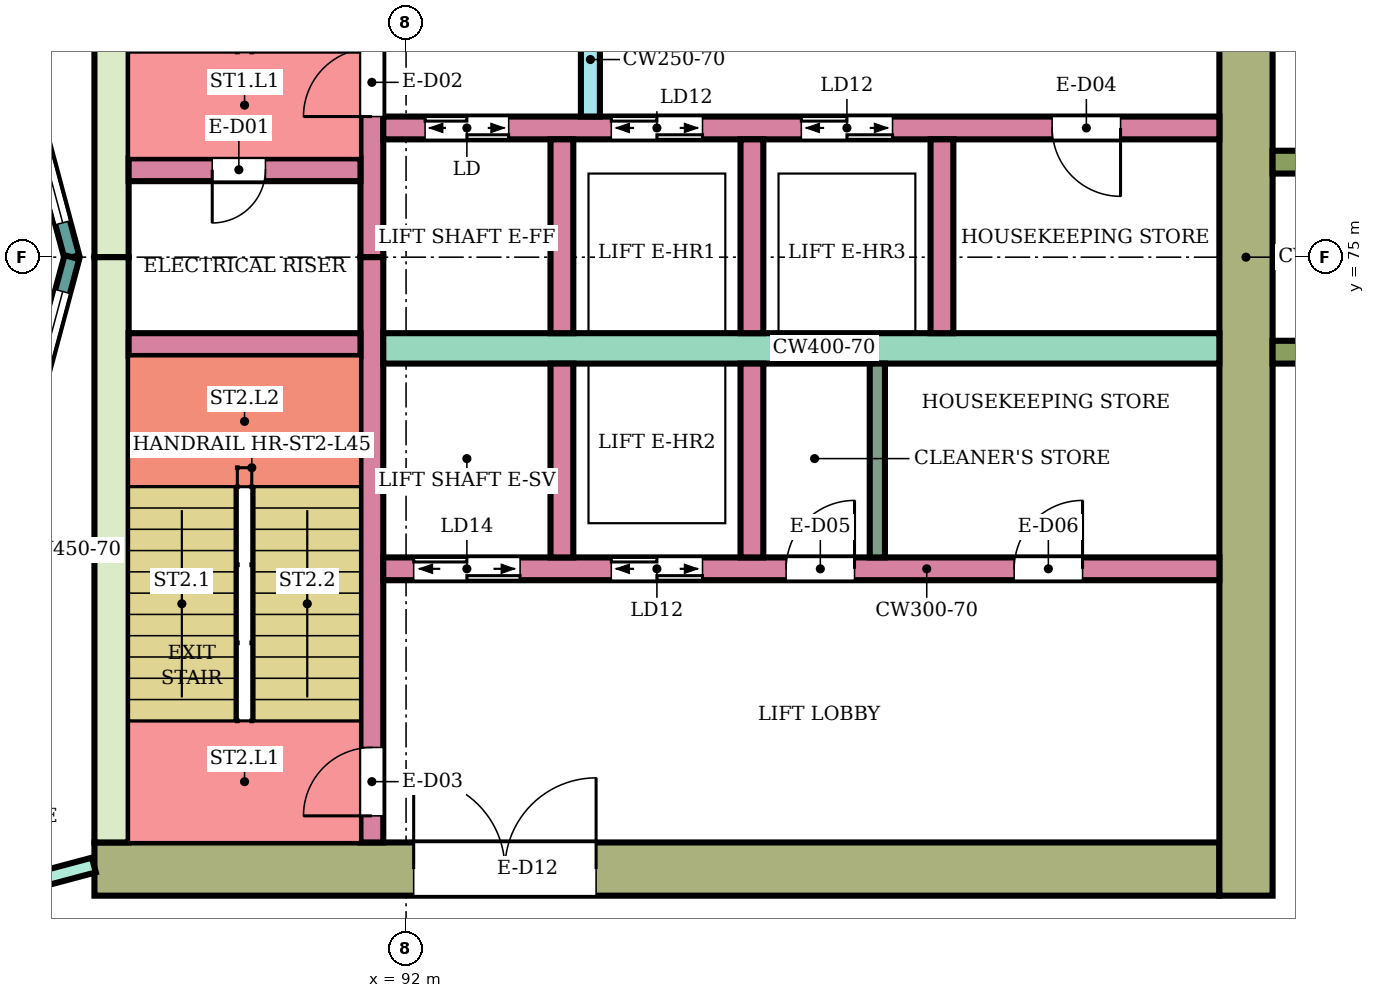
"""IFC4 building model, lengths in metres.
Left out: names, types, materials, properties, quantities, classifications, styles, units other than length and angle.
Written with IfcOpenShell. Run it as: python <this file> out.ifc"""

import sys

from ifc_helpers import new_model, si_unit, direction, frame, frame_2d, origin, place, context, subcontext, project, spatial, rectangle, extrude, element, fill, save


model = new_model("IFC4")
c1 = context("Model", 3, precision=1e-05, world=origin(), true_north=direction((0.0, 1.0)))
c2 = subcontext(c1, "Body", "Model", "MODEL_VIEW")
j1 = project(units=[si_unit("LENGTHUNIT", "METRE"), si_unit("PLANEANGLEUNIT", "RADIAN")], contexts=[c1])
p1 = place(None, origin())
s1 = spatial("IfcSite", under=j1, at=p1, CompositionType="ELEMENT")
p2 = place(p1, origin())
s2 = spatial("IfcBuilding", under=s1, at=p2, CompositionType="ELEMENT")
p3 = place(p2, frame((0.0, 0.0, 194.6)))
s3 = spatial("IfcBuildingStorey", under=s2, at=p3, CompositionType="ELEMENT", Elevation=194.6)
p4 = place(p3, frame((87.9, 66.95, 0.0), z_axis=(0.0, 0.0, 1.0), x_axis=(1.0, 0.0, 0.0)))
e1 = element("IfcWall", 1, at=p4, inside=s3, PredefinedType="SHEAR", context=c2, shape_type="SweptSolid", body=[
    extrude(rectangle(XDim=14.8, YDim=0.7, at=frame_2d((7.4, 0.0))), origin(), (0.0, 0.0, 1.0), 3.78),
])
p5 = place(p4, frame((4.2, 0.0, 0.0)))
e2 = element("IfcOpeningElement", 2, at=p5, cuts=e1, PredefinedType="OPENING", context=c2, shape_type="SweptSolid", body=[
    extrude(rectangle(XDim=2.4, YDim=2.4, at=frame_2d((1.2, 1.2))), frame((0.0, 0.36, 0.0), z_axis=(0.0, -1.0, 0.0), x_axis=(1.0, 0.0, 0.0)), (0.0, 0.0, 1.0), 0.72),
])
for number, where, z_axis, x_axis in (
    (3, (88.125, 75.0, 0.0), (0.0, 0.0, 1.0), (0.0, 1.0, 0.0)),
    (4, (88.125, 67.3, 0.0), (0.0, 0.0, 1.0), (0.0, 1.0, 0.0)),
):
    element("IfcWall", number, at=place(p3, frame(where, z_axis=z_axis, x_axis=x_axis)), inside=s3, PredefinedType="SHEAR", context=c2, shape_type="SweptSolid", body=[
        extrude(rectangle(XDim=7.7, YDim=0.45, at=frame_2d((3.85, 0.0))), origin(), (0.0, 0.0, 1.0), 3.78),
    ])
p6 = place(p3, frame((103.05, 66.6, 0.0), z_axis=(0.0, 0.0, 1.0), x_axis=(0.0, 1.0, 0.0)))
e5 = element("IfcWall", 5, at=p6, inside=s3, PredefinedType="SHEAR", context=c2, shape_type="SweptSolid", body=[
    extrude(rectangle(XDim=16.8, YDim=0.7, at=frame_2d((8.4, 0.0))), origin(), (0.0, 0.0, 1.0), 3.78),
])
p7 = place(p3, frame((91.55, 75.0, 0.0), z_axis=(0.0, 0.0, 1.0), x_axis=(0.0, 1.0, 0.0)))
e6 = element("IfcWall", 6, at=p7, inside=s3, PredefinedType="SHEAR", context=c2, shape_type="SweptSolid", body=[
    extrude(rectangle(XDim=7.7, YDim=0.3, at=frame_2d((3.85, 0.0))), origin(), (0.0, 0.0, 1.0), 3.78),
])
p8 = place(p7, frame((1.85, 0.0, 0.0)))
e7 = element("IfcOpeningElement", 7, at=p8, cuts=e6, PredefinedType="OPENING", context=c2, shape_type="SweptSolid", body=[
    extrude(rectangle(XDim=0.9, YDim=2.1, at=frame_2d((0.45, 1.05))), frame((0.0, 0.16, 0.0), z_axis=(0.0, -1.0, 0.0), x_axis=(1.0, 0.0, 0.0)), (0.0, 0.0, 1.0), 0.32),
])
p9 = place(p3, frame((91.55, 67.3, 0.0), z_axis=(0.0, 0.0, 1.0), x_axis=(0.0, 1.0, 0.0)))
e8 = element("IfcWall", 8, at=p9, inside=s3, PredefinedType="SHEAR", context=c2, shape_type="SweptSolid", body=[
    extrude(rectangle(XDim=7.7, YDim=0.3, at=frame_2d((3.85, 0.0))), origin(), (0.0, 0.0, 1.0), 3.78),
])
p10 = place(p9, frame((0.35, 0.0, 0.0)))
e9 = element("IfcOpeningElement", 9, at=p10, cuts=e8, PredefinedType="OPENING", context=c2, shape_type="SweptSolid", body=[
    extrude(rectangle(XDim=0.9, YDim=2.1, at=frame_2d((0.45, 1.05))), frame((0.0, 0.16, 0.0), z_axis=(0.0, -1.0, 0.0), x_axis=(1.0, 0.0, 0.0)), (0.0, 0.0, 1.0), 0.32),
])
p11 = place(p3, frame((88.35, 76.15, 0.0), z_axis=(0.0, 0.0, 1.0), x_axis=(1.0, 0.0, 0.0)))
e10 = element("IfcWall", 10, at=p11, inside=s3, PredefinedType="SHEAR", context=c2, shape_type="SweptSolid", body=[
    extrude(rectangle(XDim=3.05, YDim=0.3, at=frame_2d((1.525, 0.0))), origin(), (0.0, 0.0, 1.0), 3.78),
])
p12 = place(p11, frame((1.1, 0.0, 0.0)))
e11 = element("IfcOpeningElement", 11, at=p12, cuts=e10, PredefinedType="OPENING", context=c2, shape_type="SweptSolid", body=[
    extrude(rectangle(XDim=0.7, YDim=2.0, at=frame_2d((0.35, 1.0))), frame((0.0, 0.16, 0.0), z_axis=(0.0, -1.0, 0.0), x_axis=(1.0, 0.0, 0.0)), (0.0, 0.0, 1.0), 0.32),
])
p13 = place(p3, frame((88.35, 73.85, 0.0), z_axis=(0.0, 0.0, 1.0), x_axis=(1.0, 0.0, 0.0)))
e12 = element("IfcWall", 12, at=p13, inside=s3, PredefinedType="SHEAR", context=c2, shape_type="SweptSolid", body=[
    extrude(rectangle(XDim=3.05, YDim=0.3, at=frame_2d((1.525, 0.0))), origin(), (0.0, 0.0, 1.0), 3.78),
])
p14 = place(p3, frame((91.7, 76.7, 0.0), z_axis=(0.0, 0.0, 1.0), x_axis=(1.0, 0.0, 0.0)))
e13 = element("IfcWall", 13, at=p14, inside=s3, PredefinedType="SHEAR", context=c2, shape_type="SweptSolid", body=[
    extrude(rectangle(XDim=11.0, YDim=0.3, at=frame_2d((5.5, 0.0))), origin(), (0.0, 0.0, 1.0), 3.78),
])
p15 = place(p14, frame((0.55, 0.0, 0.0)))
e14 = element("IfcOpeningElement", 14, at=p15, cuts=e13, PredefinedType="OPENING", context=c2, shape_type="SweptSolid", body=[
    extrude(rectangle(XDim=1.1, YDim=2.1, at=frame_2d((0.55, 1.05))), frame((0.0, 0.16, 0.0), z_axis=(0.0, -1.0, 0.0), x_axis=(1.0, 0.0, 0.0)), (0.0, 0.0, 1.0), 0.32),
])
p16 = place(p14, frame((3.0, 0.0, 0.0)))
e15 = element("IfcOpeningElement", 15, at=p16, cuts=e13, PredefinedType="OPENING", context=c2, shape_type="SweptSolid", body=[
    extrude(rectangle(XDim=1.2, YDim=2.1, at=frame_2d((0.6, 1.05))), frame((0.0, 0.16, 0.0), z_axis=(0.0, -1.0, 0.0), x_axis=(1.0, 0.0, 0.0)), (0.0, 0.0, 1.0), 0.32),
])
p17 = place(p14, frame((5.5, 0.0, 0.0)))
e16 = element("IfcOpeningElement", 16, at=p17, cuts=e13, PredefinedType="OPENING", context=c2, shape_type="SweptSolid", body=[
    extrude(rectangle(XDim=1.2, YDim=2.1, at=frame_2d((0.6, 1.05))), frame((0.0, 0.16, 0.0), z_axis=(0.0, -1.0, 0.0), x_axis=(1.0, 0.0, 0.0)), (0.0, 0.0, 1.0), 0.32),
])
p18 = place(p14, frame((8.8, 0.0, 0.0)))
e17 = element("IfcOpeningElement", 17, at=p18, cuts=e13, PredefinedType="OPENING", context=c2, shape_type="SweptSolid", body=[
    extrude(rectangle(XDim=0.9, YDim=2.1, at=frame_2d((0.45, 1.05))), frame((0.0, 0.16, 0.0), z_axis=(0.0, -1.0, 0.0), x_axis=(1.0, 0.0, 0.0)), (0.0, 0.0, 1.0), 0.32),
])
p19 = place(p3, frame((91.7, 73.8, 0.0), z_axis=(0.0, 0.0, 1.0), x_axis=(1.0, 0.0, 0.0)))
e18 = element("IfcWall", 18, at=p19, inside=s3, PredefinedType="SHEAR", context=c2, shape_type="SweptSolid", body=[
    extrude(rectangle(XDim=11.0, YDim=0.4, at=frame_2d((5.5, 0.0))), origin(), (0.0, 0.0, 1.0), 3.78),
])
p20 = place(p3, frame((91.7, 70.9, 0.0), z_axis=(0.0, 0.0, 1.0), x_axis=(1.0, 0.0, 0.0)))
e19 = element("IfcWall", 19, at=p20, inside=s3, PredefinedType="SHEAR", context=c2, shape_type="SweptSolid", body=[
    extrude(rectangle(XDim=11.0, YDim=0.3, at=frame_2d((5.5, 0.0))), origin(), (0.0, 0.0, 1.0), 3.78),
])
p21 = place(p20, frame((0.4, 0.0, 0.0)))
e20 = element("IfcOpeningElement", 20, at=p21, cuts=e19, PredefinedType="OPENING", context=c2, shape_type="SweptSolid", body=[
    extrude(rectangle(XDim=1.4, YDim=2.1, at=frame_2d((0.7, 1.05))), frame((0.0, 0.16, 0.0), z_axis=(0.0, -1.0, 0.0), x_axis=(1.0, 0.0, 0.0)), (0.0, 0.0, 1.0), 0.32),
])
p22 = place(p20, frame((3.0, 0.0, 0.0)))
e21 = element("IfcOpeningElement", 21, at=p22, cuts=e19, PredefinedType="OPENING", context=c2, shape_type="SweptSolid", body=[
    extrude(rectangle(XDim=1.2, YDim=2.1, at=frame_2d((0.6, 1.05))), frame((0.0, 0.16, 0.0), z_axis=(0.0, -1.0, 0.0), x_axis=(1.0, 0.0, 0.0)), (0.0, 0.0, 1.0), 0.32),
])
p23 = place(p20, frame((5.3, 0.0, 0.0)))
e22 = element("IfcOpeningElement", 22, at=p23, cuts=e19, PredefinedType="OPENING", context=c2, shape_type="SweptSolid", body=[
    extrude(rectangle(XDim=0.9, YDim=2.1, at=frame_2d((0.45, 1.05))), frame((0.0, 0.16, 0.0), z_axis=(0.0, -1.0, 0.0), x_axis=(1.0, 0.0, 0.0)), (0.0, 0.0, 1.0), 0.32),
])
p24 = place(p20, frame((8.3, 0.0, 0.0)))
e23 = element("IfcOpeningElement", 23, at=p24, cuts=e19, PredefinedType="OPENING", context=c2, shape_type="SweptSolid", body=[
    extrude(rectangle(XDim=0.9, YDim=2.1, at=frame_2d((0.45, 1.05))), frame((0.0, 0.16, 0.0), z_axis=(0.0, -1.0, 0.0), x_axis=(1.0, 0.0, 0.0)), (0.0, 0.0, 1.0), 0.32),
])
for number, where, z_axis, x_axis in (
    (24, (94.05, 74.0, 0.0), (0.0, 0.0, 1.0), (0.0, 1.0, 0.0)),
    (25, (96.55, 74.0, 0.0), (0.0, 0.0, 1.0), (0.0, 1.0, 0.0)),
    (26, (99.05, 74.0, 0.0), (0.0, 0.0, 1.0), (0.0, 1.0, 0.0)),
    (27, (94.05, 71.05, 0.0), (0.0, 0.0, 1.0), (0.0, 1.0, 0.0)),
    (28, (96.55, 71.05, 0.0), (0.0, 0.0, 1.0), (0.0, 1.0, 0.0)),
):
    element("IfcWall", number, at=place(p3, frame(where, z_axis=z_axis, x_axis=x_axis)), inside=s3, PredefinedType="SHEAR", context=c2, shape_type="SweptSolid", body=[
        extrude(rectangle(XDim=2.55, YDim=0.3, at=frame_2d((1.275, 0.0))), origin(), (0.0, 0.0, 1.0), 3.78),
    ])
p25 = place(p3, frame((94.425, 76.85, 0.0), z_axis=(0.0, 0.0, 1.0), x_axis=(0.0, 1.0, 0.0)))
e29 = element("IfcWall", 29, at=p25, inside=s3, PredefinedType="SHEAR", context=c2, shape_type="SweptSolid", body=[
    extrude(rectangle(XDim=1.5, YDim=0.25, at=frame_2d((0.75, 0.0))), origin(), (0.0, 0.0, 1.0), 3.78),
])
for number, where, z_axis, x_axis in (
    (30, (103.4, 73.75, 0.0), (0.0, 0.0, 1.0), (1.0, 0.0, 0.0)),
    (31, (103.4, 76.25, 0.0), (0.0, 0.0, 1.0), (1.0, 0.0, 0.0)),
):
    element("IfcWall", number, at=place(p3, frame(where, z_axis=z_axis, x_axis=x_axis)), inside=s3, PredefinedType="NOTDEFINED", context=c2, shape_type="SweptSolid", body=[
        extrude(rectangle(XDim=2.416, YDim=0.3, at=frame_2d((1.208, 0.0))), origin(), (0.0, 0.0, 1.0), 4.1),
    ])
p26 = place(p3, frame((87.604, 75.0, 0.0), z_axis=(0.0, 0.0, 1.0), x_axis=(-0.258789828301, 0.965933654434, 0.0)))
e32 = element("IfcWall", 32, at=p26, inside=s3, PredefinedType="NOTDEFINED", context=c2, shape_type="SweptSolid", body=[
    extrude(rectangle(XDim=3.936, YDim=0.2, at=frame_2d((1.968, 0.0))), origin(), (0.0, 0.0, 1.0), 4.1),
])
p27 = place(p26, frame((0.468, 0.0, 0.9)))
e33 = element("IfcOpeningElement", 33, at=p27, cuts=e32, PredefinedType="OPENING", context=c2, shape_type="SweptSolid", body=[
    extrude(rectangle(XDim=3.0, YDim=2.3, at=frame_2d((1.5, 1.15))), frame((0.0, 0.11, 0.0), z_axis=(0.0, -1.0, 0.0), x_axis=(1.0, 0.0, 0.0)), (0.0, 0.0, 1.0), 0.22),
])
p28 = place(p3, frame((86.585, 71.198, 0.0), z_axis=(0.0, 0.0, 1.0), x_axis=(0.258789828301, 0.965933654434, 0.0)))
e34 = element("IfcWall", 34, at=p28, inside=s3, PredefinedType="NOTDEFINED", context=c2, shape_type="SweptSolid", body=[
    extrude(rectangle(XDim=3.936, YDim=0.2, at=frame_2d((1.968, 0.0))), origin(), (0.0, 0.0, 1.0), 4.1),
])
p29 = place(p28, frame((0.468, 0.0, 0.9)))
e35 = element("IfcOpeningElement", 35, at=p29, cuts=e34, PredefinedType="OPENING", context=c2, shape_type="SweptSolid", body=[
    extrude(rectangle(XDim=3.0, YDim=2.3, at=frame_2d((1.5, 1.15))), frame((0.0, 0.11, 0.0), z_axis=(0.0, -1.0, 0.0), x_axis=(1.0, 0.0, 0.0)), (0.0, 0.0, 1.0), 0.22),
])
p30 = place(p3, frame((80.0, 64.898, 0.0), z_axis=(0.0, 0.0, 1.0), x_axis=(0.966236923997, 0.25765520896, 0.0)))
e36 = element("IfcWall", 36, at=p30, inside=s3, PredefinedType="PARTITIONING", context=c2, shape_type="SweptSolid", body=[
    extrude(rectangle(XDim=8.168, YDim=0.2, at=frame_2d((4.084, 0.0))), origin(), (0.0, 0.0, 1.0), 3.65),
])
p31 = place(p30, frame((1.893, 0.0, 0.0)))
e37 = element("IfcOpeningElement", 37, at=p31, cuts=e36, PredefinedType="OPENING", context=c2, shape_type="SweptSolid", body=[
    extrude(rectangle(XDim=1.8, YDim=2.1, at=frame_2d((0.9, 1.05))), frame((0.0, 0.11, 0.0), z_axis=(0.0, -1.0, 0.0), x_axis=(1.0, 0.0, 0.0)), (0.0, 0.0, 1.0), 0.22),
])
p32 = place(p3, frame((98.2, 71.05, 0.0), z_axis=(0.0, 0.0, 1.0), x_axis=(0.0, 1.0, 0.0)))
e38 = element("IfcWall", 38, at=p32, inside=s3, PredefinedType="PARTITIONING", context=c2, shape_type="SweptSolid", body=[
    extrude(rectangle(XDim=2.55, YDim=0.2, at=frame_2d((1.275, 0.0))), origin(), (0.0, 0.0, 1.0), 3.78),
])
p33 = place(p27, origin())
e39 = element("IfcWindow", 39, at=p33, inside=s3, PartitioningType="SINGLE_PANEL", PredefinedType="WINDOW", context=c2, shape_type="SweptSolid", body=[
    extrude(rectangle(XDim=3.0, YDim=2.3, at=frame_2d((1.5, 1.15))), frame((0.0, 0.03, 0.0), z_axis=(0.0, -1.0, 0.0), x_axis=(1.0, 0.0, 0.0)), (0.0, 0.0, 1.0), 0.06),
])
fill(e33, e39)
p34 = place(p29, origin())
e40 = element("IfcWindow", 40, at=p34, inside=s3, PartitioningType="SINGLE_PANEL", PredefinedType="WINDOW", context=c2, shape_type="SweptSolid", body=[
    extrude(rectangle(XDim=3.0, YDim=2.3, at=frame_2d((1.5, 1.15))), frame((0.0, 0.03, 0.0), z_axis=(0.0, -1.0, 0.0), x_axis=(1.0, 0.0, 0.0)), (0.0, 0.0, 1.0), 0.06),
])
fill(e35, e40)
p35 = place(p12, frame((0.7, 0.0, 0.0), z_axis=(0.0, 0.0, 1.0), x_axis=(-1.0, 0.0, 0.0)))
e41 = element("IfcDoor", 41, at=p35, inside=s3, OperationType="SINGLE_SWING_RIGHT", PredefinedType="DOOR", context=c2, shape_type="SweptSolid", body=[
    extrude(rectangle(XDim=0.7, YDim=2.0, at=frame_2d((0.35, 1.0))), frame((0.0, 0.025, 0.0), z_axis=(0.0, -1.0, 0.0), x_axis=(1.0, 0.0, 0.0)), (0.0, 0.0, 1.0), 0.05),
])
fill(e11, e41)
p36 = place(p8, origin())
e42 = element("IfcDoor", 42, at=p36, inside=s3, OperationType="SINGLE_SWING_LEFT", PredefinedType="DOOR", context=c2, shape_type="SweptSolid", body=[
    extrude(rectangle(XDim=0.9, YDim=2.1, at=frame_2d((0.45, 1.05))), frame((0.0, 0.025, 0.0), z_axis=(0.0, -1.0, 0.0), x_axis=(1.0, 0.0, 0.0)), (0.0, 0.0, 1.0), 0.05),
])
fill(e7, e42)
p37 = place(p10, origin())
e43 = element("IfcDoor", 43, at=p37, inside=s3, OperationType="SINGLE_SWING_LEFT", PredefinedType="DOOR", context=c2, shape_type="SweptSolid", body=[
    extrude(rectangle(XDim=0.9, YDim=2.1, at=frame_2d((0.45, 1.05))), frame((0.0, 0.025, 0.0), z_axis=(0.0, -1.0, 0.0), x_axis=(1.0, 0.0, 0.0)), (0.0, 0.0, 1.0), 0.05),
])
fill(e9, e43)
p38 = place(p15, origin())
e44 = element("IfcDoor", 44, at=p38, inside=s3, OperationType="DOUBLE_DOOR_SLIDING", PredefinedType="DOOR", context=c2, shape_type="SweptSolid", body=[
    extrude(rectangle(XDim=1.1, YDim=2.1, at=frame_2d((0.55, 1.05))), frame((0.0, 0.025, 0.0), z_axis=(0.0, -1.0, 0.0), x_axis=(1.0, 0.0, 0.0)), (0.0, 0.0, 1.0), 0.05),
])
fill(e14, e44)
p39 = place(p16, origin())
e45 = element("IfcDoor", 45, at=p39, inside=s3, OperationType="DOUBLE_DOOR_SLIDING", PredefinedType="DOOR", context=c2, shape_type="SweptSolid", body=[
    extrude(rectangle(XDim=1.2, YDim=2.1, at=frame_2d((0.6, 1.05))), frame((0.0, 0.025, 0.0), z_axis=(0.0, -1.0, 0.0), x_axis=(1.0, 0.0, 0.0)), (0.0, 0.0, 1.0), 0.05),
])
fill(e15, e45)
p40 = place(p17, origin())
e46 = element("IfcDoor", 46, at=p40, inside=s3, OperationType="DOUBLE_DOOR_SLIDING", PredefinedType="DOOR", context=c2, shape_type="SweptSolid", body=[
    extrude(rectangle(XDim=1.2, YDim=2.1, at=frame_2d((0.6, 1.05))), frame((0.0, 0.025, 0.0), z_axis=(0.0, -1.0, 0.0), x_axis=(1.0, 0.0, 0.0)), (0.0, 0.0, 1.0), 0.05),
])
fill(e16, e46)
p41 = place(p18, frame((0.9, 0.0, 0.0), z_axis=(0.0, 0.0, 1.0), x_axis=(-1.0, 0.0, 0.0)))
e47 = element("IfcDoor", 47, at=p41, inside=s3, OperationType="SINGLE_SWING_LEFT", PredefinedType="DOOR", context=c2, shape_type="SweptSolid", body=[
    extrude(rectangle(XDim=0.9, YDim=2.1, at=frame_2d((0.45, 1.05))), frame((0.0, 0.025, 0.0), z_axis=(0.0, -1.0, 0.0), x_axis=(1.0, 0.0, 0.0)), (0.0, 0.0, 1.0), 0.05),
])
fill(e17, e47)
p42 = place(p21, origin())
e48 = element("IfcDoor", 48, at=p42, inside=s3, OperationType="DOUBLE_DOOR_SLIDING", PredefinedType="DOOR", context=c2, shape_type="SweptSolid", body=[
    extrude(rectangle(XDim=1.4, YDim=2.1, at=frame_2d((0.7, 1.05))), frame((0.0, 0.025, 0.0), z_axis=(0.0, -1.0, 0.0), x_axis=(1.0, 0.0, 0.0)), (0.0, 0.0, 1.0), 0.05),
])
fill(e20, e48)
p43 = place(p22, origin())
e49 = element("IfcDoor", 49, at=p43, inside=s3, OperationType="DOUBLE_DOOR_SLIDING", PredefinedType="DOOR", context=c2, shape_type="SweptSolid", body=[
    extrude(rectangle(XDim=1.2, YDim=2.1, at=frame_2d((0.6, 1.05))), frame((0.0, 0.025, 0.0), z_axis=(0.0, -1.0, 0.0), x_axis=(1.0, 0.0, 0.0)), (0.0, 0.0, 1.0), 0.05),
])
fill(e21, e49)
p44 = place(p23, origin())
e50 = element("IfcDoor", 50, at=p44, inside=s3, OperationType="SINGLE_SWING_RIGHT", PredefinedType="DOOR", context=c2, shape_type="SweptSolid", body=[
    extrude(rectangle(XDim=0.9, YDim=2.1, at=frame_2d((0.45, 1.05))), frame((0.0, 0.025, 0.0), z_axis=(0.0, -1.0, 0.0), x_axis=(1.0, 0.0, 0.0)), (0.0, 0.0, 1.0), 0.05),
])
fill(e22, e50)
p45 = place(p24, origin())
e51 = element("IfcDoor", 51, at=p45, inside=s3, OperationType="SINGLE_SWING_RIGHT", PredefinedType="DOOR", context=c2, shape_type="SweptSolid", body=[
    extrude(rectangle(XDim=0.9, YDim=2.1, at=frame_2d((0.45, 1.05))), frame((0.0, 0.025, 0.0), z_axis=(0.0, -1.0, 0.0), x_axis=(1.0, 0.0, 0.0)), (0.0, 0.0, 1.0), 0.05),
])
fill(e23, e51)
p46 = place(p5, origin())
e52 = element("IfcDoor", 52, at=p46, inside=s3, OperationType="DOUBLE_DOOR_SINGLE_SWING", PredefinedType="DOOR", context=c2, shape_type="SweptSolid", body=[
    extrude(rectangle(XDim=2.4, YDim=2.4, at=frame_2d((1.2, 1.2))), frame((0.0, 0.025, 0.0), z_axis=(0.0, -1.0, 0.0), x_axis=(1.0, 0.0, 0.0)), (0.0, 0.0, 1.0), 0.05),
])
fill(e2, e52)
save(model, sys.argv[1])
